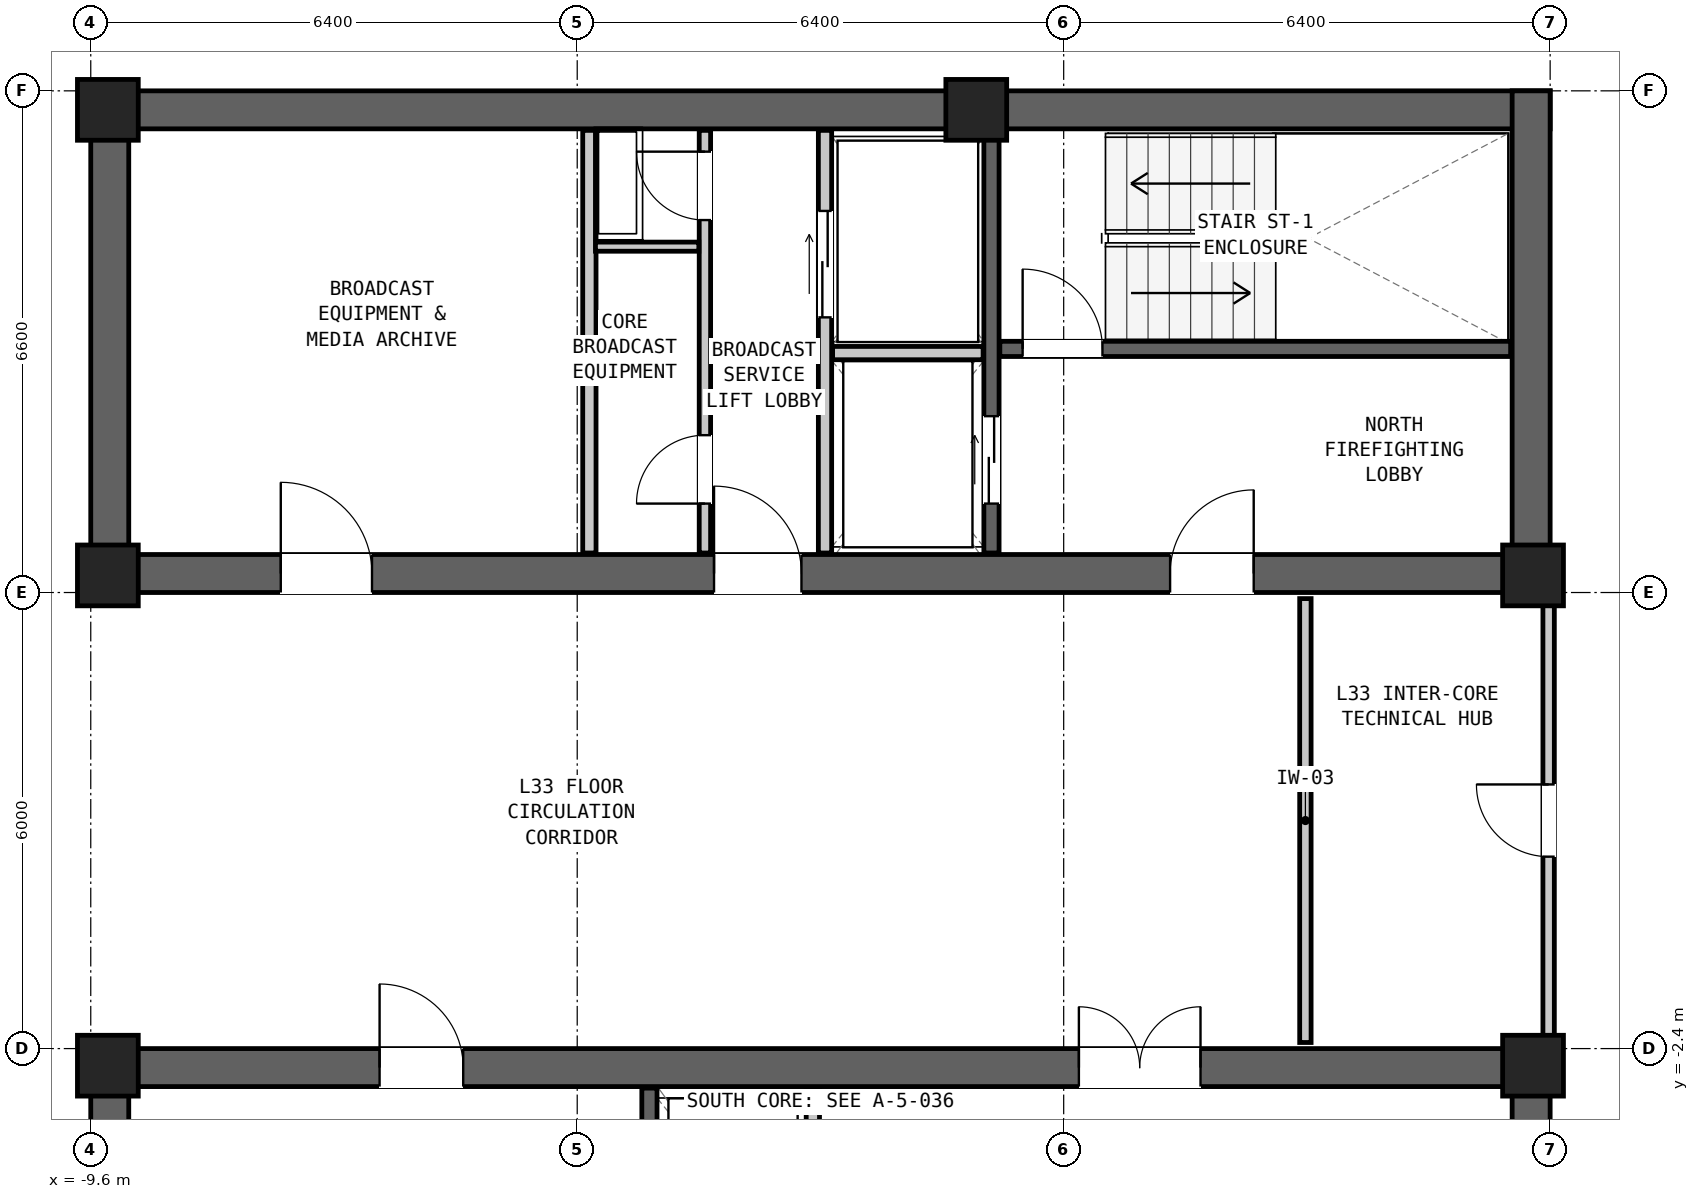
"""IFC4 building model, lengths in metres.
Left out: names, types, materials, properties, quantities, classifications, styles, units other than length and angle.
Written with IfcOpenShell. Run it as: python <this file> out.ifc"""

import sys

from ifc_helpers import new_model, si_unit, direction, frame, frame_2d, origin, origin_2d, place, context, subcontext, project, spatial, rectangle, extrude, element, fill, save


model = new_model("IFC4")
c1 = context("Model", 3, precision=1e-05, world=origin(), true_north=direction((0.0, 1.0)))
c2 = subcontext(c1, "Body", "Model", "MODEL_VIEW")
j1 = project(units=[si_unit("LENGTHUNIT", "METRE"), si_unit("PLANEANGLEUNIT", "RADIAN")], contexts=[c1])
p1 = place(None, origin())
s1 = spatial("IfcSite", under=j1, at=p1, CompositionType="ELEMENT")
p2 = place(p1, origin())
s2 = spatial("IfcBuilding", under=s1, at=p2, CompositionType="ELEMENT")
p3 = place(p2, frame((0.0, 0.0, 115.85)))
s3 = spatial("IfcBuildingStorey", under=s2, at=p3, CompositionType="ELEMENT", Elevation=115.85)
p4 = place(p3, frame((-9.6, 9.95, 0.0), z_axis=(0.0, 0.0, 1.0), x_axis=(1.0, 0.0, 0.0)))
e1 = element("IfcWall", 1, at=p4, inside=s3, PredefinedType="SHEAR", context=c2, shape_type="SweptSolid", body=[
    extrude(rectangle(XDim=19.2, YDim=0.5, at=frame_2d((9.6, 0.0))), origin(), (0.0, 0.0, 1.0), 3.05),
])
p5 = place(p3, frame((-9.6, 3.85, 0.0), z_axis=(0.0, 0.0, 1.0), x_axis=(1.0, 0.0, 0.0)))
e2 = element("IfcWall", 2, at=p5, inside=s3, PredefinedType="SHEAR", context=c2, shape_type="SweptSolid", body=[
    extrude(rectangle(XDim=19.2, YDim=0.5, at=frame_2d((9.6, 0.0))), origin(), (0.0, 0.0, 1.0), 3.05),
])
p6 = place(p5, frame((14.2, 0.0, 0.0)))
e3 = element("IfcOpeningElement", 3, at=p6, cuts=e2, PredefinedType="OPENING", context=c2, shape_type="SweptSolid", body=[
    extrude(rectangle(XDim=1.1, YDim=2.08, at=frame_2d((0.55, 1.04))), frame((0.0, 0.262, 0.0), z_axis=(0.0, -1.0, 0.0), x_axis=(1.0, 0.0, 0.0)), (0.0, 0.0, 1.0), 0.524),
])
p7 = place(p5, frame((8.2, 0.0, 0.0)))
e4 = element("IfcOpeningElement", 4, at=p7, cuts=e2, PredefinedType="OPENING", context=c2, shape_type="SweptSolid", body=[
    extrude(rectangle(XDim=1.15, YDim=2.1, at=frame_2d((0.575, 1.05))), frame((0.0, 0.262, 0.0), z_axis=(0.0, -1.0, 0.0), x_axis=(1.0, 0.0, 0.0)), (0.0, 0.0, 1.0), 0.524),
])
p8 = place(p5, frame((2.5, 0.0, 0.0)))
e5 = element("IfcOpeningElement", 5, at=p8, cuts=e2, PredefinedType="OPENING", context=c2, shape_type="SweptSolid", body=[
    extrude(rectangle(XDim=1.2, YDim=2.1, at=frame_2d((0.6, 1.05))), frame((0.0, 0.262, 0.0), z_axis=(0.0, -1.0, 0.0), x_axis=(1.0, 0.0, 0.0)), (0.0, 0.0, 1.0), 0.524),
])
for number, where, z_axis, x_axis in (
    (6, (-9.35, 3.6, 0.0), (0.0, 0.0, 1.0), (0.0, 1.0, 0.0)),
    (7, (9.35, 3.6, 0.0), (0.0, 0.0, 1.0), (0.0, 1.0, 0.0)),
):
    element("IfcWall", number, at=place(p3, frame(where, z_axis=z_axis, x_axis=x_axis)), inside=s3, PredefinedType="SHEAR", context=c2, shape_type="SweptSolid", body=[
        extrude(rectangle(XDim=6.6, YDim=0.5, at=frame_2d((3.3, 0.0))), origin(), (0.0, 0.0, 1.0), 3.05),
    ])
p9 = place(p3, frame((-9.6, -2.65, 0.0), z_axis=(0.0, 0.0, 1.0), x_axis=(1.0, 0.0, 0.0)))
e8 = element("IfcWall", 8, at=p9, inside=s3, PredefinedType="SHEAR", context=c2, shape_type="SweptSolid", body=[
    extrude(rectangle(XDim=19.2, YDim=0.5, at=frame_2d((9.6, 0.0))), origin(), (0.0, 0.0, 1.0), 3.05),
])
p10 = place(p9, frame((3.8, 0.0, 0.0)))
e9 = element("IfcOpeningElement", 9, at=p10, cuts=e8, PredefinedType="OPENING", context=c2, shape_type="SweptSolid", body=[
    extrude(rectangle(XDim=1.1, YDim=2.08, at=frame_2d((0.55, 1.04))), frame((0.0, 0.262, 0.0), z_axis=(0.0, -1.0, 0.0), x_axis=(1.0, 0.0, 0.0)), (0.0, 0.0, 1.0), 0.524),
])
p11 = place(p9, frame((13.0, 0.0, 0.0)))
e10 = element("IfcOpeningElement", 10, at=p11, cuts=e8, PredefinedType="OPENING", context=c2, shape_type="SweptSolid", body=[
    extrude(rectangle(XDim=1.6, YDim=2.12, at=frame_2d((0.8, 1.06))), frame((0.0, 0.262, 0.0), z_axis=(0.0, -1.0, 0.0), x_axis=(1.0, 0.0, 0.0)), (0.0, 0.0, 1.0), 0.524),
])
for number, where, z_axis, x_axis in (
    (11, (-9.35, -9.0, 0.0), (0.0, 0.0, 1.0), (0.0, 1.0, 0.0)),
    (12, (9.35, -9.0, 0.0), (0.0, 0.0, 1.0), (0.0, 1.0, 0.0)),
):
    element("IfcWall", number, at=place(p3, frame(where, z_axis=z_axis, x_axis=x_axis)), inside=s3, PredefinedType="SHEAR", context=c2, shape_type="SweptSolid", body=[
        extrude(rectangle(XDim=6.6, YDim=0.5, at=frame_2d((3.3, 0.0))), origin(), (0.0, 0.0, 1.0), 3.05),
    ])
for number, where, z_axis, x_axis in (
    (13, (-9.375, 9.95, 0.0), (0.0, 0.0, 1.0), (1.0, 0.0, 0.0)),
    (14, (2.05, 9.95, 0.0), (0.0, 0.0, 1.0), (1.0, 0.0, 0.0)),
    (15, (-9.375, 3.825, 0.0), (0.0, 0.0, 1.0), (1.0, 0.0, 0.0)),
    (16, (9.375, 3.825, 0.0), (0.0, 0.0, 1.0), (1.0, 0.0, 0.0)),
    (17, (-9.375, -2.625, 0.0), (0.0, 0.0, 1.0), (1.0, 0.0, 0.0)),
    (18, (9.375, -2.625, 0.0), (0.0, 0.0, 1.0), (1.0, 0.0, 0.0)),
):
    element("IfcColumn", number, at=place(p3, frame(where, z_axis=z_axis, x_axis=x_axis)), inside=s3, PredefinedType="COLUMN", context=c2, shape_type="SweptSolid", body=[
        extrude(rectangle(XDim=0.8, YDim=0.8, at=origin_2d()), origin(), (0.0, 0.0, 1.0), 3.05),
    ])
p12 = place(p3, frame((2.36, 6.805, 0.0), z_axis=(0.0, 0.0, 1.0), x_axis=(1.0, 0.0, 0.0)))
e19 = element("IfcWall", 19, at=p12, inside=s3, PredefinedType="SHEAR", context=c2, shape_type="SweptSolid", body=[
    extrude(rectangle(XDim=6.72, YDim=0.2, at=frame_2d((3.36, 0.0))), origin(), (0.0, 0.0, 1.0), 2.83),
])
p13 = place(p12, frame((0.3, 0.0, 0.0)))
e20 = element("IfcOpeningElement", 20, at=p13, cuts=e19, PredefinedType="OPENING", context=c2, shape_type="SweptSolid", body=[
    extrude(rectangle(XDim=1.05, YDim=2.08, at=frame_2d((0.525, 1.04))), frame((0.0, 0.112, 0.0), z_axis=(0.0, -1.0, 0.0), x_axis=(1.0, 0.0, 0.0)), (0.0, 0.0, 1.0), 0.224),
])
p14 = place(p3, frame((2.25, 4.12, 0.0), z_axis=(0.0, 0.0, 1.0), x_axis=(0.0, 1.0, 0.0)))
e21 = element("IfcWall", 21, at=p14, inside=s3, PredefinedType="SHEAR", context=c2, shape_type="SweptSolid", body=[
    extrude(rectangle(XDim=5.56, YDim=0.2, at=frame_2d((2.78, 0.0))), origin(), (0.0, 0.0, 1.0), 2.83),
])
p15 = place(p14, frame((0.65, 0.0, 0.0)))
e22 = element("IfcOpeningElement", 22, at=p15, cuts=e21, PredefinedType="OPENING", context=c2, shape_type="SweptSolid", body=[
    extrude(rectangle(XDim=1.15, YDim=2.08, at=frame_2d((0.575, 1.04))), frame((0.0, 0.112, 0.0), z_axis=(0.0, -1.0, 0.0), x_axis=(1.0, 0.0, 0.0)), (0.0, 0.0, 1.0), 0.224),
])
p16 = place(p3, frame((0.06, 4.12, 0.0), z_axis=(0.0, 0.0, 1.0), x_axis=(0.0, 1.0, 0.0)))
e23 = element("IfcWall", 23, at=p16, inside=s3, PredefinedType="PARTITIONING", context=c2, shape_type="SweptSolid", body=[
    extrude(rectangle(XDim=5.56, YDim=0.175, at=frame_2d((2.78, 0.0))), origin(), (0.0, 0.0, 1.0), 2.83),
])
p17 = place(p16, frame((3.1, 0.0, 0.0)))
e24 = element("IfcOpeningElement", 24, at=p17, cuts=e23, PredefinedType="OPENING", context=c2, shape_type="SweptSolid", body=[
    extrude(rectangle(XDim=1.4, YDim=2.12, at=frame_2d((0.7, 1.06))), frame((0.0, 0.1, 0.0), z_axis=(0.0, -1.0, 0.0), x_axis=(1.0, 0.0, 0.0)), (0.0, 0.0, 1.0), 0.199),
])
p18 = place(p3, frame((0.16, 6.75, 0.0), z_axis=(0.0, 0.0, 1.0), x_axis=(1.0, 0.0, 0.0)))
e25 = element("IfcWall", 25, at=p18, inside=s3, PredefinedType="PARTITIONING", context=c2, shape_type="SweptSolid", body=[
    extrude(rectangle(XDim=1.98, YDim=0.175, at=frame_2d((0.99, 0.0))), origin(), (0.0, 0.0, 1.0), 2.83),
])
p19 = place(p3, frame((-3.04, 4.12, 0.0), z_axis=(0.0, 0.0, 1.0), x_axis=(0.0, 1.0, 0.0)))
e26 = element("IfcWall", 26, at=p19, inside=s3, PredefinedType="PARTITIONING", context=c2, shape_type="SweptSolid", body=[
    extrude(rectangle(XDim=5.56, YDim=0.175, at=frame_2d((2.78, 0.0))), origin(), (0.0, 0.0, 1.0), 2.83),
])
p20 = place(p3, frame((-1.52, 4.12, 0.0), z_axis=(0.0, 0.0, 1.0), x_axis=(0.0, 1.0, 0.0)))
e27 = element("IfcWall", 27, at=p20, inside=s3, PredefinedType="PARTITIONING", context=c2, shape_type="SweptSolid", body=[
    extrude(rectangle(XDim=5.56, YDim=0.15, at=frame_2d((2.78, 0.0))), origin(), (0.0, 0.0, 1.0), 2.83),
])
p21 = place(p20, frame((4.38, 0.0, 0.0)))
e28 = element("IfcOpeningElement", 28, at=p21, cuts=e27, PredefinedType="OPENING", context=c2, shape_type="SweptSolid", body=[
    extrude(rectangle(XDim=0.9, YDim=2.05, at=frame_2d((0.45, 1.025))), frame((0.0, 0.087, 0.0), z_axis=(0.0, -1.0, 0.0), x_axis=(1.0, 0.0, 0.0)), (0.0, 0.0, 1.0), 0.174),
])
p22 = place(p20, frame((0.65, 0.0, 0.0)))
e29 = element("IfcOpeningElement", 29, at=p22, cuts=e27, PredefinedType="OPENING", context=c2, shape_type="SweptSolid", body=[
    extrude(rectangle(XDim=0.9, YDim=2.05, at=frame_2d((0.45, 1.025))), frame((0.0, 0.087, 0.0), z_axis=(0.0, -1.0, 0.0), x_axis=(1.0, 0.0, 0.0)), (0.0, 0.0, 1.0), 0.174),
])
p23 = place(p3, frame((-2.96, 8.15, 0.0), z_axis=(0.0, 0.0, 1.0), x_axis=(1.0, 0.0, 0.0)))
e30 = element("IfcWall", 30, at=p23, inside=s3, PredefinedType="PARTITIONING", context=c2, shape_type="SweptSolid", body=[
    extrude(rectangle(XDim=1.36, YDim=0.12, at=frame_2d((0.68, 0.0))), origin(), (0.0, 0.0, 1.0), 2.83),
])
p24 = place(p3, frame((-2.25, -8.48, 0.0), z_axis=(0.0, 0.0, 1.0), x_axis=(0.0, 1.0, 0.0)))
e31 = element("IfcWall", 31, at=p24, inside=s3, PredefinedType="SHEAR", context=c2, shape_type="SweptSolid", body=[
    extrude(rectangle(XDim=5.56, YDim=0.2, at=frame_2d((2.78, 0.0))), origin(), (0.0, 0.0, 1.0), 2.83),
])
p25 = place(p24, frame((3.35, 0.0, 0.0)))
e32 = element("IfcOpeningElement", 32, at=p25, cuts=e31, PredefinedType="OPENING", context=c2, shape_type="SweptSolid", body=[
    extrude(rectangle(XDim=1.15, YDim=2.08, at=frame_2d((0.575, 1.04))), frame((0.0, 0.112, 0.0), z_axis=(0.0, -1.0, 0.0), x_axis=(1.0, 0.0, 0.0)), (0.0, 0.0, 1.0), 0.224),
])
p26 = place(p3, frame((-0.1, -8.48, 0.0), z_axis=(0.0, 0.0, 1.0), x_axis=(0.0, 1.0, 0.0)))
e33 = element("IfcWall", 33, at=p26, inside=s3, PredefinedType="PARTITIONING", context=c2, shape_type="SweptSolid", body=[
    extrude(rectangle(XDim=5.56, YDim=0.175, at=frame_2d((2.78, 0.0))), origin(), (0.0, 0.0, 1.0), 2.83),
])
p27 = place(p26, frame((0.45, 0.0, 0.0)))
e34 = element("IfcOpeningElement", 34, at=p27, cuts=e33, PredefinedType="OPENING", context=c2, shape_type="SweptSolid", body=[
    extrude(rectangle(XDim=0.9, YDim=2.05, at=frame_2d((0.45, 1.025))), frame((0.0, 0.1, 0.0), z_axis=(0.0, -1.0, 0.0), x_axis=(1.0, 0.0, 0.0)), (0.0, 0.0, 1.0), 0.199),
])
p28 = place(p3, frame((6.38, -2.32, 0.0), z_axis=(0.0, 0.0, 1.0), x_axis=(0.0, 1.0, 0.0)))
e35 = element("IfcWall", 35, at=p28, inside=s3, PredefinedType="PARTITIONING", context=c2, shape_type="SweptSolid", body=[
    extrude(rectangle(XDim=5.84, YDim=0.15, at=frame_2d((2.92, 0.0))), origin(), (0.0, 0.0, 1.0), 2.198),
])
p29 = place(p3, frame((9.58, -2.32, 0.0), z_axis=(0.0, 0.0, 1.0), x_axis=(0.0, 1.0, 0.0)))
e36 = element("IfcWall", 36, at=p29, inside=s3, PredefinedType="PARTITIONING", context=c2, shape_type="SweptSolid", body=[
    extrude(rectangle(XDim=5.84, YDim=0.15, at=frame_2d((2.92, 0.0))), origin(), (0.0, 0.0, 1.0), 2.198),
])
p30 = place(p29, frame((2.445, 0.0, 0.0)))
e37 = element("IfcOpeningElement", 37, at=p30, cuts=e36, PredefinedType="OPENING", context=c2, shape_type="SweptSolid", body=[
    extrude(rectangle(XDim=0.95, YDim=2.1, at=frame_2d((0.475, 1.05))), frame((0.0, 0.087, 0.0), z_axis=(0.0, -1.0, 0.0), x_axis=(1.0, 0.0, 0.0)), (0.0, 0.0, 1.0), 0.174),
])
p31 = place(p13, origin())
e38 = element("IfcDoor", 38, at=p31, inside=s3, OperationType="SINGLE_SWING_LEFT", PredefinedType="DOOR", context=c2, shape_type="SweptSolid", body=[
    extrude(rectangle(XDim=1.05, YDim=2.08, at=frame_2d((0.525, 1.04))), frame((0.0, 0.025, 0.0), z_axis=(0.0, -1.0, 0.0), x_axis=(1.0, 0.0, 0.0)), (0.0, 0.0, 1.0), 0.05),
])
fill(e20, e38)
p32 = place(p6, origin())
e39 = element("IfcDoor", 39, at=p32, inside=s3, OperationType="SINGLE_SWING_RIGHT", PredefinedType="DOOR", context=c2, shape_type="SweptSolid", body=[
    extrude(rectangle(XDim=1.1, YDim=2.08, at=frame_2d((0.55, 1.04))), frame((0.0, 0.025, 0.0), z_axis=(0.0, -1.0, 0.0), x_axis=(1.0, 0.0, 0.0)), (0.0, 0.0, 1.0), 0.05),
])
fill(e3, e39)
p33 = place(p15, origin())
e40 = element("IfcDoor", 40, at=p33, inside=s3, OperationType="DOUBLE_DOOR_SLIDING", PredefinedType="DOOR", context=c2, shape_type="SweptSolid", body=[
    extrude(rectangle(XDim=1.15, YDim=2.08, at=frame_2d((0.575, 1.04))), frame((0.0, 0.025, 0.0), z_axis=(0.0, -1.0, 0.0), x_axis=(1.0, 0.0, 0.0)), (0.0, 0.0, 1.0), 0.05),
])
fill(e22, e40)
p34 = place(p17, origin())
e41 = element("IfcDoor", 41, at=p34, inside=s3, OperationType="DOUBLE_DOOR_SLIDING", PredefinedType="DOOR", context=c2, shape_type="SweptSolid", body=[
    extrude(rectangle(XDim=1.4, YDim=2.12, at=frame_2d((0.7, 1.06))), frame((0.0, 0.025, 0.0), z_axis=(0.0, -1.0, 0.0), x_axis=(1.0, 0.0, 0.0)), (0.0, 0.0, 1.0), 0.05),
])
fill(e24, e41)
p35 = place(p7, origin())
e42 = element("IfcDoor", 42, at=p35, inside=s3, OperationType="SINGLE_SWING_LEFT", PredefinedType="DOOR", context=c2, shape_type="SweptSolid", body=[
    extrude(rectangle(XDim=1.15, YDim=2.1, at=frame_2d((0.575, 1.05))), frame((0.0, 0.025, 0.0), z_axis=(0.0, -1.0, 0.0), x_axis=(1.0, 0.0, 0.0)), (0.0, 0.0, 1.0), 0.05),
])
fill(e4, e42)
p36 = place(p21, origin())
e43 = element("IfcDoor", 43, at=p36, inside=s3, OperationType="SINGLE_SWING_RIGHT", PredefinedType="DOOR", context=c2, shape_type="SweptSolid", body=[
    extrude(rectangle(XDim=0.9, YDim=2.05, at=frame_2d((0.45, 1.025))), frame((0.0, 0.025, 0.0), z_axis=(0.0, -1.0, 0.0), x_axis=(1.0, 0.0, 0.0)), (0.0, 0.0, 1.0), 0.05),
])
fill(e28, e43)
p37 = place(p22, origin())
e44 = element("IfcDoor", 44, at=p37, inside=s3, OperationType="SINGLE_SWING_LEFT", PredefinedType="DOOR", context=c2, shape_type="SweptSolid", body=[
    extrude(rectangle(XDim=0.9, YDim=2.05, at=frame_2d((0.45, 1.025))), frame((0.0, 0.025, 0.0), z_axis=(0.0, -1.0, 0.0), x_axis=(1.0, 0.0, 0.0)), (0.0, 0.0, 1.0), 0.05),
])
fill(e29, e44)
p38 = place(p8, origin())
e45 = element("IfcDoor", 45, at=p38, inside=s3, OperationType="SINGLE_SWING_LEFT", PredefinedType="DOOR", context=c2, shape_type="SweptSolid", body=[
    extrude(rectangle(XDim=1.2, YDim=2.1, at=frame_2d((0.6, 1.05))), frame((0.0, 0.025, 0.0), z_axis=(0.0, -1.0, 0.0), x_axis=(1.0, 0.0, 0.0)), (0.0, 0.0, 1.0), 0.05),
])
fill(e5, e45)
p39 = place(p10, origin())
e46 = element("IfcDoor", 46, at=p39, inside=s3, OperationType="SINGLE_SWING_LEFT", PredefinedType="DOOR", context=c2, shape_type="SweptSolid", body=[
    extrude(rectangle(XDim=1.1, YDim=2.08, at=frame_2d((0.55, 1.04))), frame((0.0, 0.025, 0.0), z_axis=(0.0, -1.0, 0.0), x_axis=(1.0, 0.0, 0.0)), (0.0, 0.0, 1.0), 0.05),
])
fill(e9, e46)
p40 = place(p11, origin())
e47 = element("IfcDoor", 47, at=p40, inside=s3, OperationType="DOUBLE_DOOR_SINGLE_SWING", PredefinedType="DOOR", context=c2, shape_type="SweptSolid", body=[
    extrude(rectangle(XDim=1.6, YDim=2.12, at=frame_2d((0.8, 1.06))), frame((0.0, 0.025, 0.0), z_axis=(0.0, -1.0, 0.0), x_axis=(1.0, 0.0, 0.0)), (0.0, 0.0, 1.0), 0.05),
])
fill(e10, e47)
p41 = place(p30, origin())
e48 = element("IfcDoor", 48, at=p41, inside=s3, OperationType="SINGLE_SWING_RIGHT", PredefinedType="DOOR", context=c2, shape_type="SweptSolid", body=[
    extrude(rectangle(XDim=0.95, YDim=2.1, at=frame_2d((0.475, 1.05))), frame((0.0, 0.025, 0.0), z_axis=(0.0, -1.0, 0.0), x_axis=(1.0, 0.0, 0.0)), (0.0, 0.0, 1.0), 0.05),
])
fill(e37, e48)
save(model, sys.argv[1])
